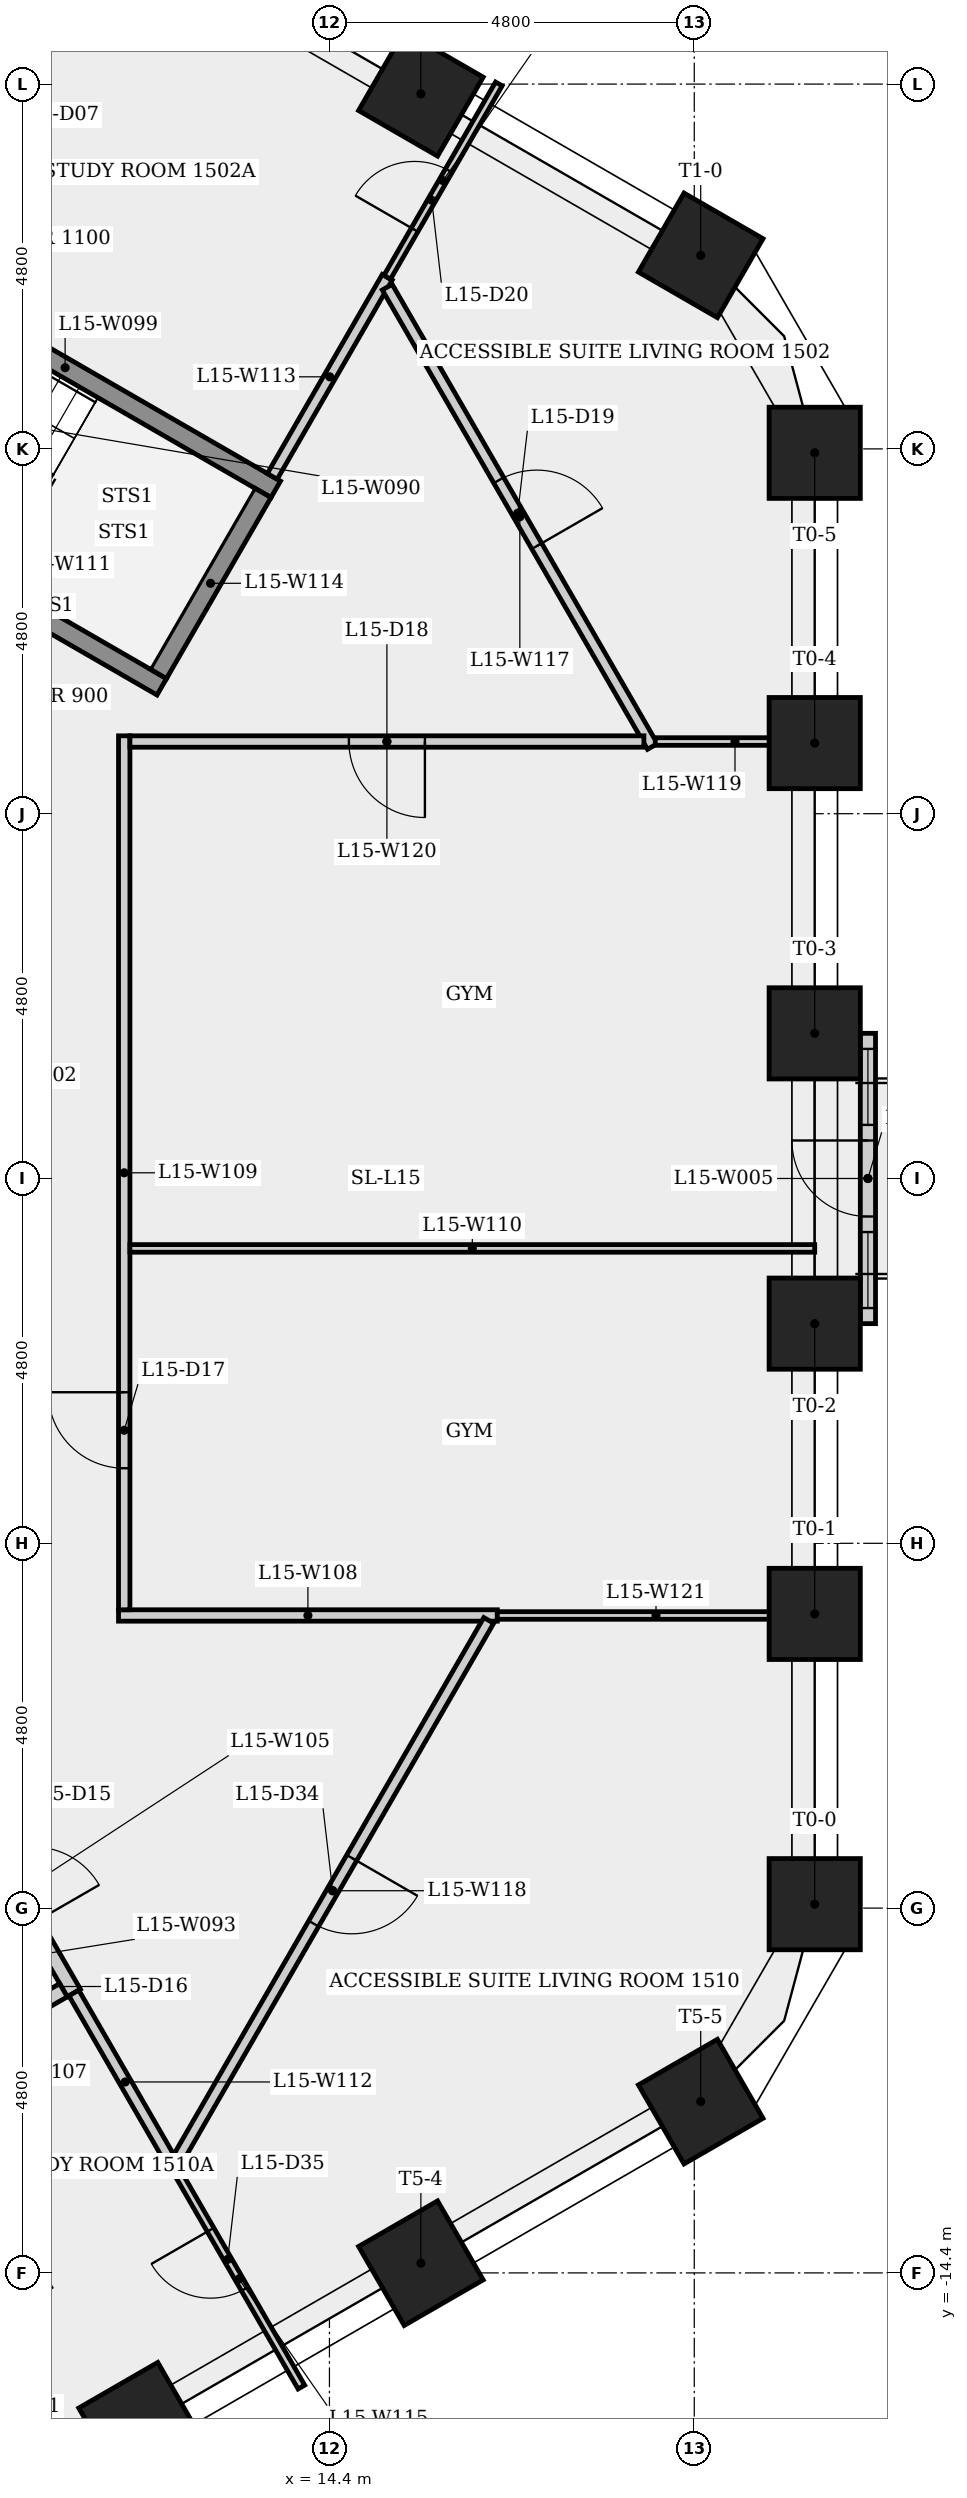
"""IFC4 building model, lengths in metres.
Left out: names, types, materials, properties, quantities, classifications, styles, units other than length and angle.
Written with IfcOpenShell. Run it as: python <this file> out.ifc"""

import sys

from ifc_helpers import new_model, si_unit, direction, frame, frame_2d, origin, origin_2d, place, context, subcontext, project, spatial, rectangle, extrude, element, fill, save


model = new_model("IFC4")
c1 = context("Model", 3, precision=1e-05, world=origin(), true_north=direction((0.0, 1.0)))
c2 = subcontext(c1, "Body", "Model", "MODEL_VIEW")
j1 = project(units=[si_unit("LENGTHUNIT", "METRE"), si_unit("PLANEANGLEUNIT", "RADIAN")], contexts=[c1])
p1 = place(None, origin())
s1 = spatial("IfcSite", under=j1, at=p1, CompositionType="ELEMENT")
p2 = place(p1, origin())
s2 = spatial("IfcBuilding", under=s1, at=p2, CompositionType="ELEMENT")
p3 = place(p2, frame((0.0, 0.0, 59.5)))
s3 = spatial("IfcBuildingStorey", under=s2, at=p3, CompositionType="ELEMENT", Elevation=59.5)
for number, where, z_axis, x_axis in (
    (1, (20.785, -9.548, 0.0), (0.0, 0.0, 1.0), (1.0, 0.0, 0.0)),
    (2, (20.785, -5.729, 0.0), (0.0, 0.0, 1.0), (1.0, 0.0, 0.0)),
    (3, (20.785, -1.91, 0.0), (0.0, 0.0, 1.0), (1.0, 0.0, 0.0)),
    (4, (20.785, 1.91, 0.0), (0.0, 0.0, 1.0), (1.0, 0.0, 0.0)),
    (5, (20.785, 5.729, 0.0), (0.0, 0.0, 1.0), (1.0, 0.0, 0.0)),
    (6, (20.785, 9.548, 0.0), (0.0, 0.0, 1.0), (1.0, 0.0, 0.0)),
    (7, (19.285, 12.146, 0.0), (0.0, 0.0, 1.0), (0.5, 0.866, 0.0)),
    (8, (15.603, 14.272, 0.0), (0.0, 0.0, 1.0), (0.5, 0.866, 0.0)),
    (9, (11.921, -16.397, 0.0), (0.0, 0.0, 1.0), (0.5, -0.866, 0.0)),
    (10, (15.603, -14.272, 0.0), (0.0, 0.0, 1.0), (0.5, -0.866, 0.0)),
    (11, (19.285, -12.146, 0.0), (0.0, 0.0, 1.0), (0.5, -0.866, 0.0)),
):
    element("IfcColumn", number, at=place(p3, frame(where, z_axis=z_axis, x_axis=x_axis)), inside=s3, PredefinedType="COLUMN", context=c2, shape_type="SweptSolid", body=[
        extrude(rectangle(XDim=1.2, YDim=1.2, at=origin_2d()), origin(), (0.0, 0.0, 1.0), 3.4),
    ])
p4 = place(p3, frame((21.485, -1.91, 0.0), z_axis=(0.0, 0.0, 1.0), x_axis=(0.0, 1.0, 0.0)))
e12 = element("IfcWall", 12, at=p4, inside=s3, PredefinedType="SOLIDWALL", context=c2, shape_type="SweptSolid", body=[
    extrude(rectangle(XDim=3.82, YDim=0.2, at=frame_2d((1.91, 0.0))), origin(), (0.0, 0.0, 1.0), 3.4),
])
p5 = place(p4, frame((1.41, 0.0, 0.0)))
e13 = element("IfcOpeningElement", 13, at=p5, cuts=e12, PredefinedType="OPENING", context=c2, shape_type="SweptSolid", body=[
    extrude(rectangle(XDim=1.0, YDim=2.4, at=frame_2d((0.5, 1.2))), frame((0.0, 0.11, 0.0), z_axis=(0.0, -1.0, 0.0), x_axis=(1.0, 0.0, 0.0)), (0.0, 0.0, 1.0), 0.22),
])
p6 = place(p4, frame((0.205, 0.0, 0.9)))
e14 = element("IfcOpeningElement", 14, at=p6, cuts=e12, PredefinedType="OPENING", context=c2, shape_type="SweptSolid", body=[
    extrude(rectangle(XDim=1.0, YDim=1.5, at=frame_2d((0.5, 0.75))), frame((0.0, 0.11, 0.0), z_axis=(0.0, -1.0, 0.0), x_axis=(1.0, 0.0, 0.0)), (0.0, 0.0, 1.0), 0.22),
])
p7 = place(p4, frame((2.615, 0.0, 0.9)))
e15 = element("IfcOpeningElement", 15, at=p7, cuts=e12, PredefinedType="OPENING", context=c2, shape_type="SweptSolid", body=[
    extrude(rectangle(XDim=1.0, YDim=1.5, at=frame_2d((0.5, 0.75))), frame((0.0, 0.11, 0.0), z_axis=(0.0, -1.0, 0.0), x_axis=(1.0, 0.0, 0.0)), (0.0, 0.0, 1.0), 0.22),
])
p8 = place(p3, frame((8.151, 12.268, 0.0), z_axis=(0.0, 0.0, 1.0), x_axis=(0.866025499775, -0.499999833739, 0.0)))
e16 = element("IfcWall", 16, at=p8, inside=s3, PredefinedType="SHEAR", context=c2, shape_type="SweptSolid", body=[
    extrude(rectangle(XDim=6.4, YDim=0.25, at=frame_2d((3.2, 0.0))), origin(), (0.0, 0.0, 1.0), 3.05),
])
p9 = place(p3, frame((9.537, -8.119, 0.0), z_axis=(0.0, 0.0, 1.0), x_axis=(0.499990139034, -0.866031096941, 0.0)))
e17 = element("IfcWall", 17, at=p9, inside=s3, PredefinedType="PARTITIONING", context=c2, shape_type="SweptSolid", body=[
    extrude(rectangle(XDim=3.0, YDim=0.2, at=frame_2d((1.5, 0.0))), origin(), (0.0, 0.0, 1.0), 3.05),
])
p10 = place(p9, frame((0.935, 0.0, 0.0)))
e18 = element("IfcOpeningElement", 18, at=p10, cuts=e17, PredefinedType="OPENING", context=c2, shape_type="SweptSolid", body=[
    extrude(rectangle(XDim=1.0, YDim=2.1, at=frame_2d((0.5, 1.05))), frame((0.0, 0.11, 0.0), z_axis=(0.0, -1.0, 0.0), x_axis=(1.0, 0.0, 0.0)), (0.0, 0.0, 1.0), 0.22),
])
p11 = place(p3, frame((10.901, -10.681, 0.0), z_axis=(0.0, 0.0, 1.0), x_axis=(-0.866009402589, -0.500027713859, 0.0)))
e19 = element("IfcWall", 19, at=p11, inside=s3, PredefinedType="PARTITIONING", context=c2, shape_type="SweptSolid", body=[
    extrude(rectangle(XDim=2.1, YDim=0.2, at=frame_2d((1.05, 0.0))), origin(), (0.0, 0.0, 1.0), 3.05),
])
p12 = place(p3, frame((11.625, -5.75, 0.0), z_axis=(0.0, 0.0, 1.0), x_axis=(1.0, 0.0, 0.0)))
e20 = element("IfcWall", 20, at=p12, inside=s3, PredefinedType="PARTITIONING", context=c2, shape_type="SweptSolid", body=[
    extrude(rectangle(XDim=4.983, YDim=0.15, at=frame_2d((2.492, 0.0))), origin(), (0.0, 0.0, 1.0), 3.05),
])
p13 = place(p3, frame((11.7, -5.675, 0.0), z_axis=(0.0, 0.0, 1.0), x_axis=(0.0, 1.0, 0.0)))
e21 = element("IfcWall", 21, at=p13, inside=s3, PredefinedType="PARTITIONING", context=c2, shape_type="SweptSolid", body=[
    extrude(rectangle(XDim=11.499, YDim=0.15, at=frame_2d((5.75, 0.0))), origin(), (0.0, 0.0, 1.0), 3.05),
])
p14 = place(p13, frame((1.862, 0.0, 0.0)))
e22 = element("IfcOpeningElement", 22, at=p14, cuts=e21, PredefinedType="OPENING", context=c2, shape_type="SweptSolid", body=[
    extrude(rectangle(XDim=1.0, YDim=2.1, at=frame_2d((0.5, 1.05))), frame((0.0, 0.085, 0.0), z_axis=(0.0, -1.0, 0.0), x_axis=(1.0, 0.0, 0.0)), (0.0, 0.0, 1.0), 0.17),
])
p15 = place(p3, frame((11.775, -0.92, 0.0), z_axis=(0.0, 0.0, 1.0), x_axis=(1.0, 0.0, 0.0)))
e23 = element("IfcWall", 23, at=p15, inside=s3, PredefinedType="PARTITIONING", context=c2, shape_type="SweptSolid", body=[
    extrude(rectangle(XDim=9.01, YDim=0.1, at=frame_2d((4.505, 0.0))), origin(), (0.0, 0.0, 1.0), 3.05),
])
p16 = place(p3, frame((12.194, 6.47, 0.0), z_axis=(0.0, 0.0, 1.0), x_axis=(-0.866025499775, 0.499999833739, 0.0)))
e24 = element("IfcWall", 24, at=p16, inside=s3, PredefinedType="SHEAR", context=c2, shape_type="SweptSolid", body=[
    extrude(rectangle(XDim=6.4, YDim=0.25, at=frame_2d((3.2, 0.0))), origin(), (0.0, 0.0, 1.0), 3.05),
])
p17 = place(p16, frame((5.25, 0.0, 0.0)))
e25 = element("IfcOpeningElement", 25, at=p17, cuts=e24, PredefinedType="OPENING", context=c2, shape_type="SweptSolid", body=[
    extrude(rectangle(XDim=1.0, YDim=2.1, at=frame_2d((0.5, 1.05))), frame((0.0, 0.135, 0.0), z_axis=(0.0, -1.0, 0.0), x_axis=(1.0, 0.0, 0.0)), (0.0, 0.0, 1.0), 0.27),
])
p18 = place(p3, frame((12.389, -13.058, 0.0), z_axis=(0.0, 0.0, 1.0), x_axis=(-0.499985657998, 0.866033683985, 0.0)))
e26 = element("IfcWall", 26, at=p18, inside=s3, PredefinedType="PARTITIONING", context=c2, shape_type="SweptSolid", body=[
    extrude(rectangle(XDim=2.703, YDim=0.15, at=frame_2d((1.352, 0.0))), origin(), (0.0, 0.0, 1.0), 3.05),
])
p19 = place(p3, frame((13.648, 9.239, 0.0), z_axis=(0.0, 0.0, 1.0), x_axis=(0.500036864363, 0.866004119088, 0.0)))
e27 = element("IfcWall", 27, at=p19, inside=s3, PredefinedType="PARTITIONING", context=c2, shape_type="SweptSolid", body=[
    extrude(rectangle(XDim=3.025, YDim=0.15, at=frame_2d((1.512, 0.0))), origin(), (0.0, 0.0, 1.0), 3.05),
])
p20 = place(p3, frame((13.523, 9.022, 0.0), z_axis=(0.0, 0.0, 1.0), x_axis=(-0.500034990121, -0.866005201286, 0.0)))
e28 = element("IfcWall", 28, at=p20, inside=s3, PredefinedType="SHEAR", context=c2, shape_type="SweptSolid", body=[
    extrude(rectangle(XDim=2.75, YDim=0.25, at=frame_2d((1.375, 0.0))), origin(), (0.0, 0.0, 1.0), 3.05),
])
p21 = place(p3, frame((14.031, -15.902, 0.0), z_axis=(0.0, 0.0, 1.0), x_axis=(-0.500024907045, 0.866011023218, 0.0)))
e29 = element("IfcWall", 29, at=p21, inside=s3, PredefinedType="PARTITIONING", context=c2, shape_type="SweptSolid", body=[
    extrude(rectangle(XDim=3.284, YDim=0.1, at=frame_2d((1.642, 0.0))), origin(), (0.0, 0.0, 1.0), 3.05),
])
p22 = place(p21, frame((1.49, 0.0, 0.0)))
e30 = element("IfcOpeningElement", 30, at=p22, cuts=e29, PredefinedType="OPENING", context=c2, shape_type="SweptSolid", body=[
    extrude(rectangle(XDim=0.9, YDim=2.1, at=frame_2d((0.45, 1.05))), frame((0.0, 0.06, 0.0), z_axis=(0.0, -1.0, 0.0), x_axis=(1.0, 0.0, 0.0)), (0.0, 0.0, 1.0), 0.12),
])
p23 = place(p3, frame((15.16, 11.858, 0.0), z_axis=(0.0, 0.0, 1.0), x_axis=(0.500000635496, 0.86602503688, 0.0)))
e31 = element("IfcWall", 31, at=p23, inside=s3, PredefinedType="PARTITIONING", context=c2, shape_type="SweptSolid", body=[
    extrude(rectangle(XDim=2.938, YDim=0.1, at=frame_2d((1.469, 0.0))), origin(), (0.0, 0.0, 1.0), 3.05),
])
p24 = place(p23, frame((0.721, 0.0, 0.0)))
e32 = element("IfcOpeningElement", 32, at=p24, cuts=e31, PredefinedType="OPENING", context=c2, shape_type="SweptSolid", body=[
    extrude(rectangle(XDim=0.9, YDim=2.1, at=frame_2d((0.45, 1.05))), frame((0.0, 0.06, 0.0), z_axis=(0.0, -1.0, 0.0), x_axis=(1.0, 0.0, 0.0)), (0.0, 0.0, 1.0), 0.12),
])
p25 = place(p3, frame((15.16, 11.728, 0.0), z_axis=(0.0, 0.0, 1.0), x_axis=(0.499991973402, -0.866030037893, 0.0)))
e33 = element("IfcWall", 33, at=p25, inside=s3, PredefinedType="PARTITIONING", context=c2, shape_type="SweptSolid", body=[
    extrude(rectangle(XDim=6.979, YDim=0.15, at=frame_2d((3.489, 0.0))), origin(), (0.0, 0.0, 1.0), 3.05),
])
p26 = place(p25, frame((2.935, 0.0, 0.0)))
e34 = element("IfcOpeningElement", 34, at=p26, cuts=e33, PredefinedType="OPENING", context=c2, shape_type="SweptSolid", body=[
    extrude(rectangle(XDim=1.0, YDim=2.1, at=frame_2d((0.5, 1.05))), frame((0.0, 0.085, 0.0), z_axis=(0.0, -1.0, 0.0), x_axis=(1.0, 0.0, 0.0)), (0.0, 0.0, 1.0), 0.17),
])
p27 = place(p3, frame((16.496, -5.815, 0.0), z_axis=(0.0, 0.0, 1.0), x_axis=(-0.500016611795, -0.866015812748, 0.0)))
e35 = element("IfcWall", 35, at=p27, inside=s3, PredefinedType="PARTITIONING", context=c2, shape_type="SweptSolid", body=[
    extrude(rectangle(XDim=8.214, YDim=0.15, at=frame_2d((4.107, 0.0))), origin(), (0.0, 0.0, 1.0), 3.05),
])
p28 = place(p27, frame((3.607, 0.0, 0.0)))
e36 = element("IfcOpeningElement", 36, at=p28, cuts=e35, PredefinedType="OPENING", context=c2, shape_type="SweptSolid", body=[
    extrude(rectangle(XDim=1.0, YDim=2.1, at=frame_2d((0.5, 1.05))), frame((0.0, 0.085, 0.0), z_axis=(0.0, -1.0, 0.0), x_axis=(1.0, 0.0, 0.0)), (0.0, 0.0, 1.0), 0.17),
])
p29 = place(p3, frame((18.687, 5.75, 0.0), z_axis=(0.0, 0.0, 1.0), x_axis=(1.0, 0.0, 0.0)))
e37 = element("IfcWall", 37, at=p29, inside=s3, PredefinedType="PARTITIONING", context=c2, shape_type="SweptSolid", body=[
    extrude(rectangle(XDim=2.098, YDim=0.1, at=frame_2d((1.049, 0.0))), origin(), (0.0, 0.0, 1.0), 3.05),
])
p30 = place(p3, frame((18.537, 5.75, 0.0), z_axis=(0.0, 0.0, 1.0), x_axis=(-1.0, 0.0, 0.0)))
e38 = element("IfcWall", 38, at=p30, inside=s3, PredefinedType="PARTITIONING", context=c2, shape_type="SweptSolid", body=[
    extrude(rectangle(XDim=6.762, YDim=0.15, at=frame_2d((3.381, 0.0))), origin(), (0.0, 0.0, 1.0), 3.05),
])
p31 = place(p30, frame((2.881, 0.0, 0.0)))
e39 = element("IfcOpeningElement", 39, at=p31, cuts=e38, PredefinedType="OPENING", context=c2, shape_type="SweptSolid", body=[
    extrude(rectangle(XDim=1.0, YDim=2.1, at=frame_2d((0.5, 1.05))), frame((0.0, 0.085, 0.0), z_axis=(0.0, -1.0, 0.0), x_axis=(1.0, 0.0, 0.0)), (0.0, 0.0, 1.0), 0.17),
])
p32 = place(p3, frame((20.785, -5.75, 0.0), z_axis=(0.0, 0.0, 1.0), x_axis=(-1.0, 0.0, 0.0)))
e40 = element("IfcWall", 40, at=p32, inside=s3, PredefinedType="PARTITIONING", context=c2, shape_type="SweptSolid", body=[
    extrude(rectangle(XDim=4.176, YDim=0.1, at=frame_2d((2.088, 0.0))), origin(), (0.0, 0.0, 1.0), 3.05),
])
p33 = place(p5, origin())
e41 = element("IfcDoor", 41, at=p33, inside=s3, OperationType="SINGLE_SWING_RIGHT", PredefinedType="DOOR", context=c2, shape_type="SweptSolid", body=[
    extrude(rectangle(XDim=1.0, YDim=2.4, at=frame_2d((0.5, 1.2))), frame((0.0, 0.025, 0.0), z_axis=(0.0, -1.0, 0.0), x_axis=(1.0, 0.0, 0.0)), (0.0, 0.0, 1.0), 0.05),
])
fill(e13, e41)
p34 = place(p6, origin())
e42 = element("IfcWindow", 42, at=p34, inside=s3, PartitioningType="SINGLE_PANEL", PredefinedType="WINDOW", context=c2, shape_type="SweptSolid", body=[
    extrude(rectangle(XDim=1.0, YDim=1.5, at=frame_2d((0.5, 0.75))), frame((0.0, 0.03, 0.0), z_axis=(0.0, -1.0, 0.0), x_axis=(1.0, 0.0, 0.0)), (0.0, 0.0, 1.0), 0.06),
])
fill(e14, e42)
p35 = place(p7, origin())
e43 = element("IfcWindow", 43, at=p35, inside=s3, PartitioningType="SINGLE_PANEL", PredefinedType="WINDOW", context=c2, shape_type="SweptSolid", body=[
    extrude(rectangle(XDim=1.0, YDim=1.5, at=frame_2d((0.5, 0.75))), frame((0.0, 0.03, 0.0), z_axis=(0.0, -1.0, 0.0), x_axis=(1.0, 0.0, 0.0)), (0.0, 0.0, 1.0), 0.06),
])
fill(e15, e43)
p36 = place(p14, origin())
e44 = element("IfcDoor", 44, at=p36, inside=s3, OperationType="SINGLE_SWING_RIGHT", PredefinedType="DOOR", context=c2, shape_type="SweptSolid", body=[
    extrude(rectangle(XDim=1.0, YDim=2.1, at=frame_2d((0.5, 1.05))), frame((0.0, 0.025, 0.0), z_axis=(0.0, -1.0, 0.0), x_axis=(1.0, 0.0, 0.0)), (0.0, 0.0, 1.0), 0.05),
])
fill(e22, e44)
p37 = place(p31, origin())
e45 = element("IfcDoor", 45, at=p37, inside=s3, OperationType="SINGLE_SWING_LEFT", PredefinedType="DOOR", context=c2, shape_type="SweptSolid", body=[
    extrude(rectangle(XDim=1.0, YDim=2.1, at=frame_2d((0.5, 1.05))), frame((0.0, 0.025, 0.0), z_axis=(0.0, -1.0, 0.0), x_axis=(1.0, 0.0, 0.0)), (0.0, 0.0, 1.0), 0.05),
])
fill(e39, e45)
p38 = place(p26, origin())
e46 = element("IfcDoor", 46, at=p38, inside=s3, OperationType="SINGLE_SWING_RIGHT", PredefinedType="DOOR", context=c2, shape_type="SweptSolid", body=[
    extrude(rectangle(XDim=1.0, YDim=2.1, at=frame_2d((0.5, 1.05))), frame((0.0, 0.025, 0.0), z_axis=(0.0, -1.0, 0.0), x_axis=(1.0, 0.0, 0.0)), (0.0, 0.0, 1.0), 0.05),
])
fill(e34, e46)
p39 = place(p24, origin())
e47 = element("IfcDoor", 47, at=p39, inside=s3, OperationType="SINGLE_SWING_LEFT", PredefinedType="DOOR", context=c2, shape_type="SweptSolid", body=[
    extrude(rectangle(XDim=0.9, YDim=2.1, at=frame_2d((0.45, 1.05))), frame((0.0, 0.025, 0.0), z_axis=(0.0, -1.0, 0.0), x_axis=(1.0, 0.0, 0.0)), (0.0, 0.0, 1.0), 0.05),
])
fill(e32, e47)
p40 = place(p28, origin())
e48 = element("IfcDoor", 48, at=p40, inside=s3, OperationType="SINGLE_SWING_LEFT", PredefinedType="DOOR", context=c2, shape_type="SweptSolid", body=[
    extrude(rectangle(XDim=1.0, YDim=2.1, at=frame_2d((0.5, 1.05))), frame((0.0, 0.025, 0.0), z_axis=(0.0, -1.0, 0.0), x_axis=(1.0, 0.0, 0.0)), (0.0, 0.0, 1.0), 0.05),
])
fill(e36, e48)
p41 = place(p22, origin())
e49 = element("IfcDoor", 49, at=p41, inside=s3, OperationType="SINGLE_SWING_RIGHT", PredefinedType="DOOR", context=c2, shape_type="SweptSolid", body=[
    extrude(rectangle(XDim=0.9, YDim=2.1, at=frame_2d((0.45, 1.05))), frame((0.0, 0.025, 0.0), z_axis=(0.0, -1.0, 0.0), x_axis=(1.0, 0.0, 0.0)), (0.0, 0.0, 1.0), 0.05),
])
fill(e30, e49)
save(model, sys.argv[1])
